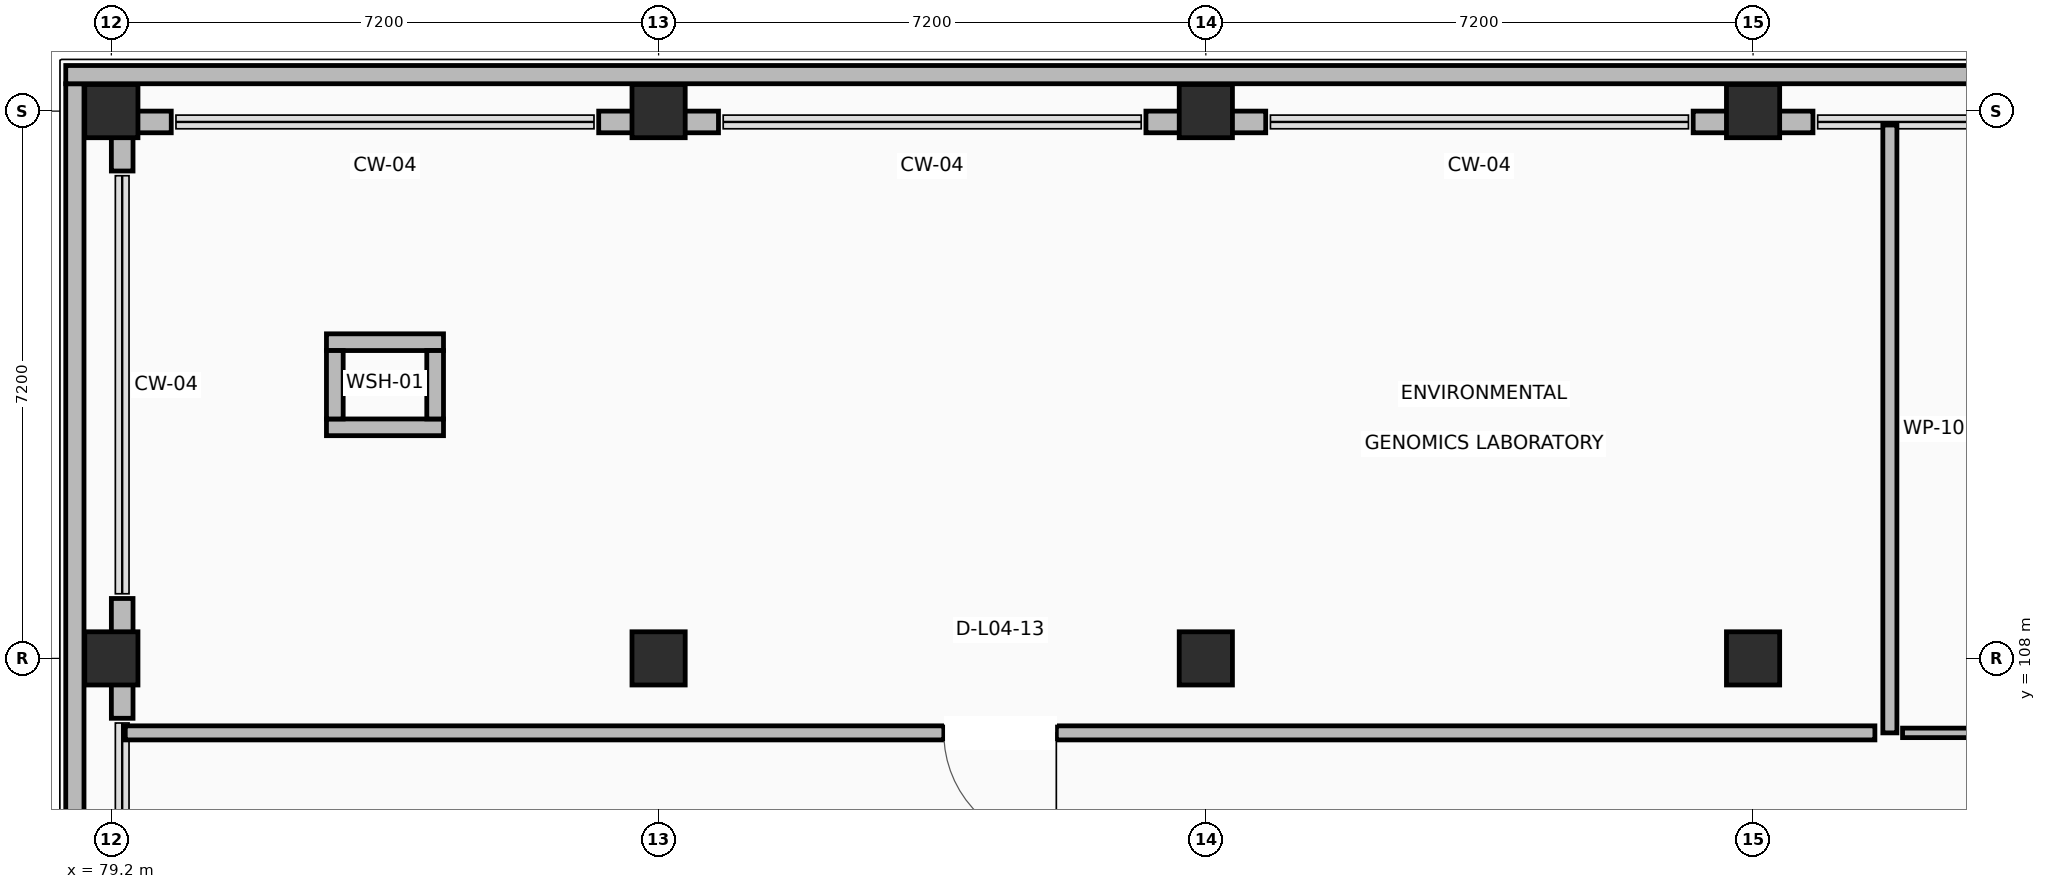
"""IFC4 building model, lengths in metres.
Left out: names, types, materials, properties, quantities, classifications, styles, units other than length and angle.
Written with IfcOpenShell. Run it as: python <this file> out.ifc"""

import sys

from ifc_helpers import new_model, si_unit, direction, frame, frame_2d, origin, origin_2d, place, context, subcontext, project, spatial, rectangle, extrude, element, fill, save


model = new_model("IFC4")
c1 = context("Model", 3, precision=1e-05, world=origin(), true_north=direction((0.0, 1.0)))
c2 = subcontext(c1, "Body", "Model", "MODEL_VIEW")
j1 = project(units=[si_unit("LENGTHUNIT", "METRE"), si_unit("PLANEANGLEUNIT", "RADIAN")], contexts=[c1])
p1 = place(None, origin())
s1 = spatial("IfcSite", under=j1, at=p1, CompositionType="ELEMENT")
p2 = place(p1, origin())
s2 = spatial("IfcBuilding", under=s1, at=p2, CompositionType="ELEMENT")
p3 = place(p2, frame((0.0, 0.0, 18.0)))
s3 = spatial("IfcBuildingStorey", under=s2, at=p3, CompositionType="ELEMENT", Elevation=18.0)
for number, where, z_axis, x_axis in (
    (1, (79.2, 108.0, 0.0), (0.0, 0.0, 1.0), (1.0, 0.0, 0.0)),
    (2, (79.2, 115.2, 0.0), (0.0, 0.0, 1.0), (1.0, 0.0, 0.0)),
    (3, (86.4, 108.0, 0.0), (0.0, 0.0, 1.0), (1.0, 0.0, 0.0)),
    (4, (86.4, 115.2, 0.0), (0.0, 0.0, 1.0), (1.0, 0.0, 0.0)),
    (5, (93.6, 108.0, 0.0), (0.0, 0.0, 1.0), (1.0, 0.0, 0.0)),
    (6, (93.6, 115.2, 0.0), (0.0, 0.0, 1.0), (1.0, 0.0, 0.0)),
    (7, (100.8, 108.0, 0.0), (0.0, 0.0, 1.0), (1.0, 0.0, 0.0)),
    (8, (100.8, 115.2, 0.0), (0.0, 0.0, 1.0), (1.0, 0.0, 0.0)),
):
    element("IfcColumn", number, at=place(p3, frame(where, z_axis=z_axis, x_axis=x_axis)), inside=s3, PredefinedType="COLUMN", context=c2, shape_type="SweptSolid", body=[
        extrude(rectangle(XDim=0.7, YDim=0.7, at=origin_2d()), origin(), (0.0, 0.0, 1.0), 4.22),
    ])
for number, where, z_axis, x_axis in (
    (9, (101.588, 115.058, 0.0), (0.0, 0.0, 1.0), (-1.0, 0.0, 0.0)),
    (10, (94.388, 115.058, 0.0), (0.0, 0.0, 1.0), (-1.0, 0.0, 0.0)),
    (11, (87.188, 115.058, 0.0), (0.0, 0.0, 1.0), (-1.0, 0.0, 0.0)),
):
    element("IfcWall", number, at=place(p3, frame(where, z_axis=z_axis, x_axis=x_axis)), inside=s3, PredefinedType="STANDARD", context=c2, shape_type="SweptSolid", body=[
        extrude(rectangle(XDim=1.576, YDim=0.285, at=frame_2d((0.788, 0.0))), origin(), (0.0, 0.0, 1.0), 3.26),
    ])
p4 = place(p3, frame((79.988, 115.058, 0.0), z_axis=(0.0, 0.0, 1.0), x_axis=(-1.0, 0.0, 0.0)))
e12 = element("IfcWall", 12, at=p4, inside=s3, PredefinedType="STANDARD", context=c2, shape_type="SweptSolid", body=[
    extrude(rectangle(XDim=0.788, YDim=0.285, at=frame_2d((0.394, 0.0))), origin(), (0.0, 0.0, 1.0), 3.26),
])
p5 = place(p3, frame((79.343, 114.915, 0.0), z_axis=(0.0, 0.0, 1.0), x_axis=(0.0, -1.0, 0.0)))
e13 = element("IfcWall", 13, at=p5, inside=s3, PredefinedType="STANDARD", context=c2, shape_type="SweptSolid", body=[
    extrude(rectangle(XDim=0.503, YDim=0.285, at=frame_2d((0.251, 0.0))), origin(), (0.0, 0.0, 1.0), 3.26),
])
p6 = place(p3, frame((79.343, 108.788, 0.0), z_axis=(0.0, 0.0, 1.0), x_axis=(0.0, -1.0, 0.0)))
e14 = element("IfcWall", 14, at=p6, inside=s3, PredefinedType="STANDARD", context=c2, shape_type="SweptSolid", body=[
    extrude(rectangle(XDim=1.576, YDim=0.285, at=frame_2d((0.788, 0.0))), origin(), (0.0, 0.0, 1.0), 3.26),
])
p7 = place(p3, frame((78.72, 93.24, 0.0), z_axis=(0.0, 0.0, 1.0), x_axis=(0.0, 1.0, 0.0)))
e15 = element("IfcWall", 15, at=p7, inside=s3, PredefinedType="PARAPET", context=c2, shape_type="SweptSolid", body=[
    extrude(rectangle(XDim=22.32, YDim=0.24, at=frame_2d((11.16, 0.0))), origin(), (0.0, 0.0, 1.0), 1.12),
])
p8 = place(p3, frame((78.6, 115.68, 0.0), z_axis=(0.0, 0.0, 1.0), x_axis=(1.0, 0.0, 0.0)))
e16 = element("IfcWall", 16, at=p8, inside=s3, PredefinedType="PARAPET", context=c2, shape_type="SweptSolid", body=[
    extrude(rectangle(XDim=73.2, YDim=0.24, at=frame_2d((36.6, 0.0))), origin(), (0.0, 0.0, 1.0), 1.12),
])
for number, where, z_axis, x_axis in (
    (17, (82.03, 111.04, 0.0), (0.0, 0.0, 1.0), (1.0, 0.0, 0.0)),
    (18, (82.03, 112.16, 0.0), (0.0, 0.0, 1.0), (1.0, 0.0, 0.0)),
):
    element("IfcWall", number, at=place(p3, frame(where, z_axis=z_axis, x_axis=x_axis)), inside=s3, PredefinedType="STANDARD", context=c2, shape_type="SweptSolid", body=[
        extrude(rectangle(XDim=1.54, YDim=0.22, at=frame_2d((0.77, 0.0))), origin(), (0.0, 0.0, 1.0), 3.26),
    ])
for number, where, z_axis, x_axis in (
    (19, (82.14, 111.15, 0.0), (0.0, 0.0, 1.0), (0.0, 1.0, 0.0)),
    (20, (83.46, 111.15, 0.0), (0.0, 0.0, 1.0), (0.0, 1.0, 0.0)),
):
    element("IfcWall", number, at=place(p3, frame(where, z_axis=z_axis, x_axis=x_axis)), inside=s3, PredefinedType="STANDARD", context=c2, shape_type="SweptSolid", body=[
        extrude(rectangle(XDim=0.9, YDim=0.22, at=frame_2d((0.45, 0.0))), origin(), (0.0, 0.0, 1.0), 3.26),
    ])
p9 = place(p3, frame((102.6, 115.017, 0.0), z_axis=(0.0, 0.0, 1.0), x_axis=(0.0, -1.0, 0.0)))
e21 = element("IfcWall", 21, at=p9, inside=s3, PredefinedType="PARTITIONING", context=c2, shape_type="SweptSolid", body=[
    extrude(rectangle(XDim=7.997, YDim=0.185, at=frame_2d((3.999, 0.0))), origin(), (0.0, 0.0, 1.0), 3.26),
])
p10 = place(p3, frame((102.403, 107.02, 0.0), z_axis=(0.0, 0.0, 1.0), x_axis=(-1.0, 0.0, 0.0)))
e22 = element("IfcWall", 22, at=p10, inside=s3, PredefinedType="PARTITIONING", context=c2, shape_type="SweptSolid", body=[
    extrude(rectangle(XDim=23.02, YDim=0.185, at=frame_2d((11.51, 0.0))), origin(), (0.0, 0.0, 1.0), 3.26),
])
p11 = place(p10, frame((10.77, 0.0, 0.0)))
e23 = element("IfcOpeningElement", 23, at=p11, cuts=e22, PredefinedType="OPENING", context=c2, shape_type="SweptSolid", body=[
    extrude(rectangle(XDim=1.48, YDim=2.2, at=frame_2d((0.74, 1.1))), frame((0.0, 0.103, 0.0), z_axis=(0.0, -1.0, 0.0), x_axis=(1.0, 0.0, 0.0)), (0.0, 0.0, 1.0), 0.205),
])
p12 = place(p3, frame((125.863, 107.02, 0.0), z_axis=(0.0, 0.0, 1.0), x_axis=(-1.0, 0.0, 0.0)))
e24 = element("IfcWall", 24, at=p12, inside=s3, PredefinedType="PARTITIONING", context=c2, shape_type="SweptSolid", body=[
    extrude(rectangle(XDim=23.096, YDim=0.125, at=frame_2d((11.548, 0.0))), origin(), (0.0, 0.0, 1.0), 3.26),
])
p13 = place(p12, frame((11.228, 0.0, 0.0)))
e25 = element("IfcOpeningElement", 25, at=p13, cuts=e24, PredefinedType="OPENING", context=c2, shape_type="SweptSolid", body=[
    extrude(rectangle(XDim=0.94, YDim=2.1, at=frame_2d((0.47, 1.05))), frame((0.0, 0.073, 0.0), z_axis=(0.0, -1.0, 0.0), x_axis=(1.0, 0.0, 0.0)), (0.0, 0.0, 1.0), 0.145),
])
p14 = place(p11, origin())
e26 = element("IfcDoor", 26, at=p14, inside=s3, OperationType="SINGLE_SWING_LEFT", PredefinedType="DOOR", context=c2, shape_type="SweptSolid", body=[
    extrude(rectangle(XDim=1.48, YDim=2.2, at=frame_2d((0.74, 1.1))), frame((0.0, 0.025, 0.0), z_axis=(0.0, -1.0, 0.0), x_axis=(1.0, 0.0, 0.0)), (0.0, 0.0, 1.0), 0.05),
])
fill(e23, e26)
save(model, sys.argv[1])
